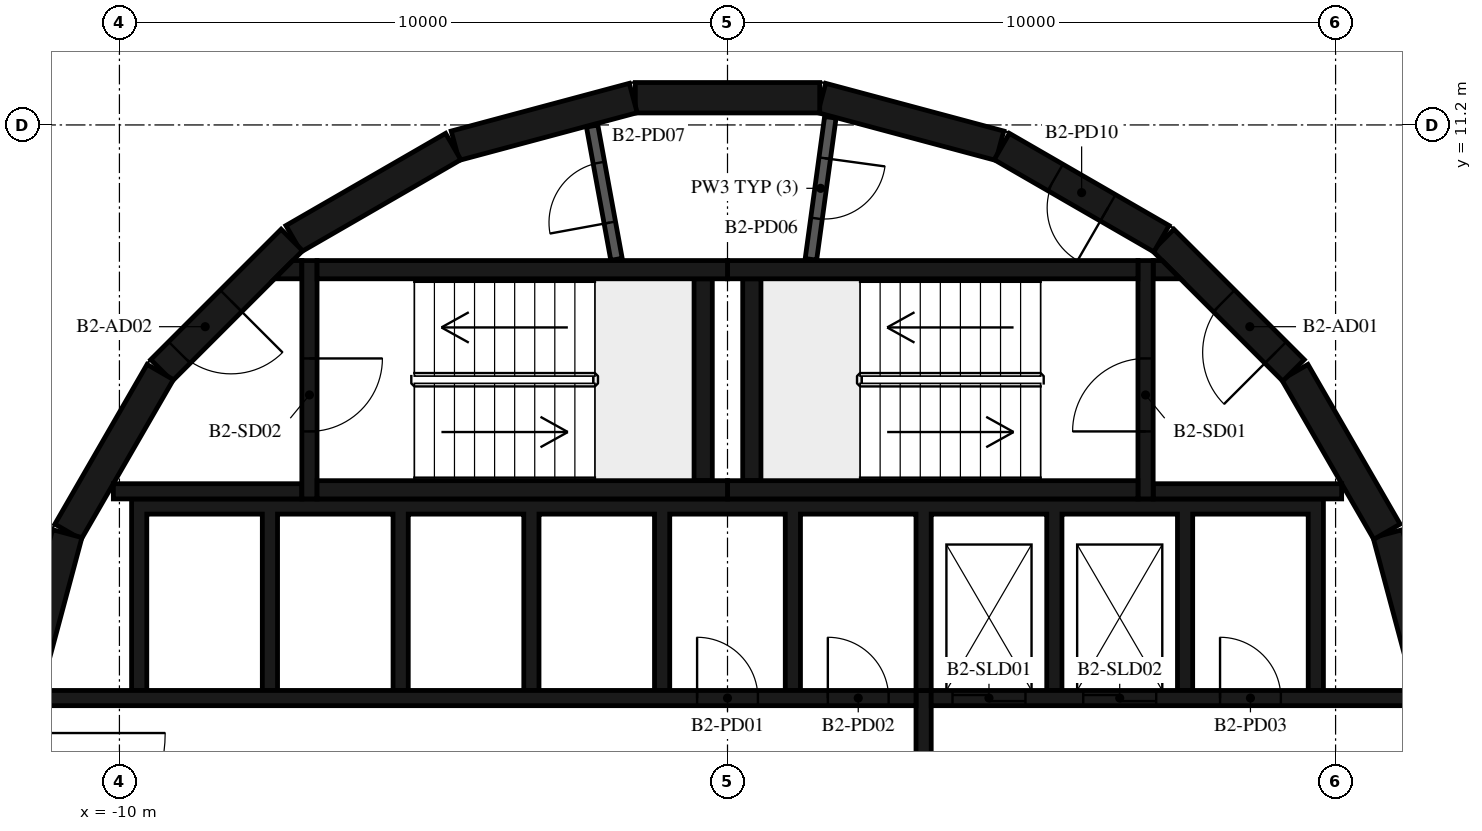
"""IFC4 building model, lengths in metres.
Left out: names, types, materials, properties, quantities, classifications, styles, units other than length and angle.
Written with IfcOpenShell. Run it as: python <this file> out.ifc"""

import sys

from ifc_helpers import new_model, si_unit, direction, frame, frame_2d, origin, place, context, subcontext, project, spatial, polyline, rectangle, outline, extrude, element, fill, save


model = new_model("IFC4")
c1 = context("Model", 3, precision=1e-05, world=origin(), true_north=direction((0.0, 1.0)))
c2 = subcontext(c1, "Body", "Model", "MODEL_VIEW")
j1 = project(units=[si_unit("LENGTHUNIT", "METRE"), si_unit("PLANEANGLEUNIT", "RADIAN")], contexts=[c1])
p1 = place(None, origin())
s1 = spatial("IfcSite", under=j1, at=p1, CompositionType="ELEMENT")
p2 = place(p1, origin())
s2 = spatial("IfcBuilding", under=s1, at=p2, CompositionType="ELEMENT")
p3 = place(p2, frame((0.0, 0.0, -8.4)))
s3 = spatial("IfcBuildingStorey", under=s2, at=p3, CompositionType="ELEMENT", Elevation=-8.4)
for number, where, z_axis, x_axis in (
    (1, (11.643, 1.55, 0.0), (0.0, 0.0, 1.0), (-0.259, 0.966, 0.0)),
    (2, (10.845, 4.51, 0.0), (0.0, 0.0, 1.0), (-0.5, 0.866, 0.0)),
):
    element("IfcWall", number, at=place(p3, frame(where, z_axis=z_axis, x_axis=x_axis)), inside=s3, PredefinedType="SHEAR", context=c2, shape_type="SweptSolid", body=[
        extrude(rectangle(XDim=3.033, YDim=0.5, at=frame_2d((1.516, 0.0))), origin(), (0.0, 0.0, 1.0), 3.82),
    ])
p4 = place(p3, frame((9.308, 7.164, 0.0), z_axis=(0.0, 0.0, 1.0), x_axis=(-0.707106781187, 0.707106781187, 0.0)))
e3 = element("IfcWall", 3, at=p4, inside=s3, PredefinedType="SHEAR", context=c2, shape_type="SweptSolid", body=[
    extrude(rectangle(XDim=3.032, YDim=0.5, at=frame_2d((1.516, 0.0))), origin(), (0.0, 0.0, 1.0), 3.82),
])
p5 = place(p4, frame((0.416, 0.0, 0.0)))
e4 = element("IfcOpeningElement", 4, at=p5, cuts=e3, PredefinedType="OPENING", context=c2, shape_type="SweptSolid", body=[
    extrude(rectangle(XDim=1.2, YDim=2.1, at=frame_2d((0.6, 1.05))), frame((0.0, 0.26, 0.0), z_axis=(0.0, -1.0, 0.0), x_axis=(1.0, 0.0, 0.0)), (0.0, 0.0, 1.0), 0.52),
])
p6 = place(p3, frame((7.137, 9.329, 0.0), z_axis=(0.0, 0.0, 1.0), x_axis=(-0.865975092491, 0.500087131594, 0.0)))
e5 = element("IfcWall", 5, at=p6, inside=s3, PredefinedType="SHEAR", context=c2, shape_type="SweptSolid", body=[
    extrude(rectangle(XDim=3.033, YDim=0.5, at=frame_2d((1.516, 0.0))), origin(), (0.0, 0.0, 1.0), 3.82),
])
p7 = place(p6, frame((1.016, 0.0, 0.0)))
e6 = element("IfcOpeningElement", 6, at=p7, cuts=e5, PredefinedType="OPENING", context=c2, shape_type="SweptSolid", body=[
    extrude(rectangle(XDim=1.0, YDim=2.4, at=frame_2d((0.5, 1.2))), frame((0.0, 0.26, 0.0), z_axis=(0.0, -1.0, 0.0), x_axis=(1.0, 0.0, 0.0)), (0.0, 0.0, 1.0), 0.52),
])
for number, where, z_axis, x_axis in (
    (7, (4.479, 10.858, 0.0), (0.0, 0.0, 1.0), (-0.966, 0.259, 0.0)),
    (8, (1.516, 11.647, 0.0), (0.0, 0.0, 1.0), (-1.0, 0.0, 0.0)),
    (9, (-1.55, 11.643, 0.0), (0.0, 0.0, 1.0), (-0.966, -0.259, 0.0)),
    (10, (-4.51, 10.845, 0.0), (0.0, 0.0, 1.0), (-0.866, -0.5, 0.0)),
):
    element("IfcWall", number, at=place(p3, frame(where, z_axis=z_axis, x_axis=x_axis)), inside=s3, PredefinedType="SHEAR", context=c2, shape_type="SweptSolid", body=[
        extrude(rectangle(XDim=3.033, YDim=0.5, at=frame_2d((1.516, 0.0))), origin(), (0.0, 0.0, 1.0), 3.82),
    ])
p8 = place(p3, frame((-7.164, 9.308, 0.0), z_axis=(0.0, 0.0, 1.0), x_axis=(-0.707106781187, -0.707106781187, 0.0)))
e11 = element("IfcWall", 11, at=p8, inside=s3, PredefinedType="SHEAR", context=c2, shape_type="SweptSolid", body=[
    extrude(rectangle(XDim=3.032, YDim=0.5, at=frame_2d((1.516, 0.0))), origin(), (0.0, 0.0, 1.0), 3.82),
])
p9 = place(p8, frame((1.416, 0.0, 0.0)))
e12 = element("IfcOpeningElement", 12, at=p9, cuts=e11, PredefinedType="OPENING", context=c2, shape_type="SweptSolid", body=[
    extrude(rectangle(XDim=1.2, YDim=2.1, at=frame_2d((0.6, 1.05))), frame((0.0, 0.26, 0.0), z_axis=(0.0, -1.0, 0.0), x_axis=(1.0, 0.0, 0.0)), (0.0, 0.0, 1.0), 0.52),
])
for number, where, z_axis, x_axis in (
    (13, (-9.329, 7.137, 0.0), (0.0, 0.0, 1.0), (-0.5, -0.866, 0.0)),
    (14, (-10.858, 4.479, 0.0), (0.0, 0.0, 1.0), (-0.259, -0.966, 0.0)),
):
    element("IfcWall", number, at=place(p3, frame(where, z_axis=z_axis, x_axis=x_axis)), inside=s3, PredefinedType="SHEAR", context=c2, shape_type="SweptSolid", body=[
        extrude(rectangle(XDim=3.033, YDim=0.5, at=frame_2d((1.516, 0.0))), origin(), (0.0, 0.0, 1.0), 3.82),
    ])
for number, where, z_axis, x_axis in (
    (15, (0.0, 5.2, 0.0), (0.0, 0.0, 1.0), (1.0, 0.0, 0.0)),
    (16, (0.0, 8.82, 0.0), (0.0, 0.0, 1.0), (1.0, 0.0, 0.0)),
):
    element("IfcWall", number, at=place(p3, frame(where, z_axis=z_axis, x_axis=x_axis)), inside=s3, PredefinedType="SHEAR", context=c2, shape_type="SweptSolid", body=[
        extrude(rectangle(XDim=6.75, YDim=0.3, at=frame_2d((3.375, 0.0))), origin(), (0.0, 0.0, 1.0), 3.82),
    ])
p10 = place(p3, frame((0.4, 5.35, 0.0), z_axis=(0.0, 0.0, 1.0), x_axis=(0.0, 1.0, 0.0)))
e17 = element("IfcWall", 17, at=p10, inside=s3, PredefinedType="SHEAR", context=c2, shape_type="SweptSolid", body=[
    extrude(rectangle(XDim=3.32, YDim=0.3, at=frame_2d((1.66, 0.0))), origin(), (0.0, 0.0, 1.0), 3.82),
])
p11 = place(p3, frame((6.875, 5.05, 0.0), z_axis=(0.0, 0.0, 1.0), x_axis=(0.0, 1.0, 0.0)))
e18 = element("IfcWall", 18, at=p11, inside=s3, PredefinedType="SHEAR", context=c2, shape_type="SweptSolid", body=[
    extrude(rectangle(XDim=3.92, YDim=0.25, at=frame_2d((1.96, 0.0))), origin(), (0.0, 0.0, 1.0), 3.82),
])
p12 = place(p11, frame((1.11, 0.0, 0.0)))
e19 = element("IfcOpeningElement", 19, at=p12, cuts=e18, PredefinedType="OPENING", context=c2, shape_type="SweptSolid", body=[
    extrude(rectangle(XDim=1.2, YDim=2.1, at=frame_2d((0.6, 1.05))), frame((0.0, 0.135, 0.0), z_axis=(0.0, -1.0, 0.0), x_axis=(1.0, 0.0, 0.0)), (0.0, 0.0, 1.0), 0.27),
])
p13 = place(p3, frame((7.0, 5.175, 0.0), z_axis=(0.0, 0.0, 1.0), x_axis=(1.0, 0.0, 0.0)))
e20 = element("IfcWall", 20, at=p13, inside=s3, PredefinedType="SHEAR", context=c2, shape_type="SweptSolid", body=[
    extrude(rectangle(XDim=3.1, YDim=0.25, at=frame_2d((1.55, 0.0))), origin(), (0.0, 0.0, 1.0), 3.82),
])
p14 = place(p3, origin())
e21 = element("IfcWall", 21, at=p14, inside=s3, PredefinedType="SHEAR", context=c2, shape_type="SweptSolid", body=[
    extrude(outline(polyline([(7.448, 8.67), (7.0, 8.67), (7.0, 8.97), (7.148, 8.97), (7.448, 8.67)])), origin(), (0.0, 0.0, 1.0), 3.82),
])
for number, where, z_axis, x_axis in (
    (22, (-6.75, 5.2, 0.0), (0.0, 0.0, 1.0), (1.0, 0.0, 0.0)),
    (23, (-6.75, 8.82, 0.0), (0.0, 0.0, 1.0), (1.0, 0.0, 0.0)),
):
    element("IfcWall", number, at=place(p3, frame(where, z_axis=z_axis, x_axis=x_axis)), inside=s3, PredefinedType="SHEAR", context=c2, shape_type="SweptSolid", body=[
        extrude(rectangle(XDim=6.75, YDim=0.3, at=frame_2d((3.375, 0.0))), origin(), (0.0, 0.0, 1.0), 3.82),
    ])
p15 = place(p3, frame((-0.4, 5.35, 0.0), z_axis=(0.0, 0.0, 1.0), x_axis=(0.0, 1.0, 0.0)))
e24 = element("IfcWall", 24, at=p15, inside=s3, PredefinedType="SHEAR", context=c2, shape_type="SweptSolid", body=[
    extrude(rectangle(XDim=3.32, YDim=0.3, at=frame_2d((1.66, 0.0))), origin(), (0.0, 0.0, 1.0), 3.82),
])
p16 = place(p3, frame((-6.875, 8.97, 0.0), z_axis=(0.0, 0.0, 1.0), x_axis=(0.0, -1.0, 0.0)))
e25 = element("IfcWall", 25, at=p16, inside=s3, PredefinedType="SHEAR", context=c2, shape_type="SweptSolid", body=[
    extrude(rectangle(XDim=3.92, YDim=0.25, at=frame_2d((1.96, 0.0))), origin(), (0.0, 0.0, 1.0), 3.82),
])
p17 = place(p16, frame((1.61, 0.0, 0.0)))
e26 = element("IfcOpeningElement", 26, at=p17, cuts=e25, PredefinedType="OPENING", context=c2, shape_type="SweptSolid", body=[
    extrude(rectangle(XDim=1.2, YDim=2.1, at=frame_2d((0.6, 1.05))), frame((0.0, 0.135, 0.0), z_axis=(0.0, -1.0, 0.0), x_axis=(1.0, 0.0, 0.0)), (0.0, 0.0, 1.0), 0.27),
])
p18 = place(p3, frame((-7.0, 5.175, 0.0), z_axis=(0.0, 0.0, 1.0), x_axis=(-1.0, 0.0, 0.0)))
e27 = element("IfcWall", 27, at=p18, inside=s3, PredefinedType="SHEAR", context=c2, shape_type="SweptSolid", body=[
    extrude(rectangle(XDim=3.1, YDim=0.25, at=frame_2d((1.55, 0.0))), origin(), (0.0, 0.0, 1.0), 3.82),
])
p19 = place(p3, origin())
e28 = element("IfcWall", 28, at=p19, inside=s3, PredefinedType="SHEAR", context=c2, shape_type="SweptSolid", body=[
    extrude(outline(polyline([(-7.148, 8.97), (-7.0, 8.97), (-7.0, 8.67), (-7.448, 8.67), (-7.148, 8.97)])), origin(), (0.0, 0.0, 1.0), 3.82),
])
p20 = place(p3, origin())
e29 = element("IfcWall", 29, at=p20, inside=s3, PredefinedType="SHEAR", context=c2, shape_type="SweptSolid", body=[
    extrude(outline(polyline([(-9.55, 4.8), (-7.65, 4.8), (-7.65, 1.9), (-7.4, 1.9), (-7.4, 4.8), (-5.5, 4.8), (-5.5, 1.9), (-5.25, 1.9), (-5.25, 4.8), (-3.35, 4.8), (-3.35, 1.9), (-3.1, 1.9), (-3.1, 4.8), (-1.2, 4.8), (-1.2, 1.9), (-0.95, 1.9), (-0.95, 4.8), (0.95, 4.8), (0.95, 1.9), (1.2, 1.9), (1.2, 4.8), (3.1, 4.8), (3.1, 1.9), (3.35, 1.9), (3.35, 4.8), (5.25, 4.8), (5.25, 1.9), (5.5, 1.9), (5.5, 4.8), (7.4, 4.8), (7.4, 1.9), (7.65, 1.9), (7.65, 4.8), (9.55, 4.8), (9.55, 1.9), (9.8, 1.9), (9.8, 4.8), (9.8, 5.05), (-9.8, 5.05), (-9.8, 4.8), (-9.8, 1.9), (-9.55, 1.9), (-9.55, 4.8)])), origin(), (0.0, 0.0, 1.0), 3.82),
])
p21 = place(p3, frame((-11.28, 1.775, 0.0), z_axis=(0.0, 0.0, 1.0), x_axis=(1.0, 0.0, 0.0)))
e30 = element("IfcWall", 30, at=p21, inside=s3, PredefinedType="SHEAR", context=c2, shape_type="SweptSolid", body=[
    extrude(rectangle(XDim=14.38, YDim=0.25, at=frame_2d((7.19, 0.0))), origin(), (0.0, 0.0, 1.0), 3.82),
])
p22 = place(p21, frame((10.78, 0.0, 0.0)))
e31 = element("IfcOpeningElement", 31, at=p22, cuts=e30, PredefinedType="OPENING", context=c2, shape_type="SweptSolid", body=[
    extrude(rectangle(XDim=1.0, YDim=2.4, at=frame_2d((0.5, 1.2))), frame((0.0, 0.135, 0.0), z_axis=(0.0, -1.0, 0.0), x_axis=(1.0, 0.0, 0.0)), (0.0, 0.0, 1.0), 0.27),
])
p23 = place(p21, frame((12.93, 0.0, 0.0)))
e32 = element("IfcOpeningElement", 32, at=p23, cuts=e30, PredefinedType="OPENING", context=c2, shape_type="SweptSolid", body=[
    extrude(rectangle(XDim=1.0, YDim=2.4, at=frame_2d((0.5, 1.2))), frame((0.0, 0.135, 0.0), z_axis=(0.0, -1.0, 0.0), x_axis=(1.0, 0.0, 0.0)), (0.0, 0.0, 1.0), 0.27),
])
p24 = place(p3, frame((3.35, 1.775, 0.0), z_axis=(0.0, 0.0, 1.0), x_axis=(1.0, 0.0, 0.0)))
e33 = element("IfcWall", 33, at=p24, inside=s3, PredefinedType="SHEAR", context=c2, shape_type="SweptSolid", body=[
    extrude(rectangle(XDim=7.93, YDim=0.25, at=frame_2d((3.965, 0.0))), origin(), (0.0, 0.0, 1.0), 3.82),
])
p25 = place(p24, frame((0.35, 0.0, 0.0)))
e34 = element("IfcOpeningElement", 34, at=p25, cuts=e33, PredefinedType="OPENING", context=c2, shape_type="SweptSolid", body=[
    extrude(rectangle(XDim=1.2, YDim=2.4, at=frame_2d((0.6, 1.2))), frame((0.0, 0.135, 0.0), z_axis=(0.0, -1.0, 0.0), x_axis=(1.0, 0.0, 0.0)), (0.0, 0.0, 1.0), 0.27),
])
p26 = place(p24, frame((2.5, 0.0, 0.0)))
e35 = element("IfcOpeningElement", 35, at=p26, cuts=e33, PredefinedType="OPENING", context=c2, shape_type="SweptSolid", body=[
    extrude(rectangle(XDim=1.2, YDim=2.4, at=frame_2d((0.6, 1.2))), frame((0.0, 0.135, 0.0), z_axis=(0.0, -1.0, 0.0), x_axis=(1.0, 0.0, 0.0)), (0.0, 0.0, 1.0), 0.27),
])
p27 = place(p24, frame((4.75, 0.0, 0.0)))
e36 = element("IfcOpeningElement", 36, at=p27, cuts=e33, PredefinedType="OPENING", context=c2, shape_type="SweptSolid", body=[
    extrude(rectangle(XDim=1.0, YDim=2.4, at=frame_2d((0.5, 1.2))), frame((0.0, 0.135, 0.0), z_axis=(0.0, -1.0, 0.0), x_axis=(1.0, 0.0, 0.0)), (0.0, 0.0, 1.0), 0.27),
])
p28 = place(p3, frame((3.225, -1.9, 0.0), z_axis=(0.0, 0.0, 1.0), x_axis=(0.0, 1.0, 0.0)))
e37 = element("IfcWall", 37, at=p28, inside=s3, PredefinedType="SHEAR", context=c2, shape_type="SweptSolid", body=[
    extrude(rectangle(XDim=3.8, YDim=0.25, at=frame_2d((1.9, 0.0))), origin(), (0.0, 0.0, 1.0), 3.82),
])
p29 = place(p3, frame((1.691, 11.326, 0.0), z_axis=(0.0, 0.0, 1.0), x_axis=(-0.135344253201, -0.990798633994, 0.0)))
e38 = element("IfcWall", 38, at=p29, inside=s3, PredefinedType="PARTITIONING", context=c2, shape_type="SweptSolid", body=[
    extrude(rectangle(XDim=2.358, YDim=0.19, at=frame_2d((1.179, 0.0))), origin(), (0.0, 0.0, 1.0), 3.82),
])
p30 = place(p29, frame((0.679, 0.0, 0.0)))
e39 = element("IfcOpeningElement", 39, at=p30, cuts=e38, PredefinedType="OPENING", context=c2, shape_type="SweptSolid", body=[
    extrude(rectangle(XDim=1.0, YDim=2.4, at=frame_2d((0.5, 1.2))), frame((0.0, 0.105, 0.0), z_axis=(0.0, -1.0, 0.0), x_axis=(1.0, 0.0, 0.0)), (0.0, 0.0, 1.0), 0.21),
])
p31 = place(p3, frame((-1.825, 8.99, 0.0), z_axis=(0.0, 0.0, 1.0), x_axis=(-0.179955206115, 0.983674805915, 0.0)))
e40 = element("IfcWall", 40, at=p31, inside=s3, PredefinedType="PARTITIONING", context=c2, shape_type="SweptSolid", body=[
    extrude(rectangle(XDim=2.229, YDim=0.19, at=frame_2d((1.115, 0.0))), origin(), (0.0, 0.0, 1.0), 3.82),
])
p32 = place(p31, frame((0.615, 0.0, 0.0)))
e41 = element("IfcOpeningElement", 41, at=p32, cuts=e40, PredefinedType="OPENING", context=c2, shape_type="SweptSolid", body=[
    extrude(rectangle(XDim=1.0, YDim=2.4, at=frame_2d((0.5, 1.2))), frame((0.0, 0.105, 0.0), z_axis=(0.0, -1.0, 0.0), x_axis=(1.0, 0.0, 0.0)), (0.0, 0.0, 1.0), 0.21),
])
p33 = place(p12, origin())
e42 = element("IfcDoor", 42, at=p33, inside=s3, OperationType="SINGLE_SWING_LEFT", PredefinedType="DOOR", context=c2, shape_type="SweptSolid", body=[
    extrude(rectangle(XDim=1.2, YDim=2.1, at=frame_2d((0.6, 1.05))), frame((0.0, 0.025, 0.0), z_axis=(0.0, -1.0, 0.0), x_axis=(1.0, 0.0, 0.0)), (0.0, 0.0, 1.0), 0.05),
])
fill(e19, e42)
p34 = place(p5, origin())
e43 = element("IfcDoor", 43, at=p34, inside=s3, OperationType="SINGLE_SWING_RIGHT", PredefinedType="DOOR", context=c2, shape_type="SweptSolid", body=[
    extrude(rectangle(XDim=1.2, YDim=2.1, at=frame_2d((0.6, 1.05))), frame((0.0, 0.025, 0.0), z_axis=(0.0, -1.0, 0.0), x_axis=(1.0, 0.0, 0.0)), (0.0, 0.0, 1.0), 0.05),
])
fill(e4, e43)
p35 = place(p17, origin())
e44 = element("IfcDoor", 44, at=p35, inside=s3, OperationType="SINGLE_SWING_LEFT", PredefinedType="DOOR", context=c2, shape_type="SweptSolid", body=[
    extrude(rectangle(XDim=1.2, YDim=2.1, at=frame_2d((0.6, 1.05))), frame((0.0, 0.025, 0.0), z_axis=(0.0, -1.0, 0.0), x_axis=(1.0, 0.0, 0.0)), (0.0, 0.0, 1.0), 0.05),
])
fill(e26, e44)
p36 = place(p9, origin())
e45 = element("IfcDoor", 45, at=p36, inside=s3, OperationType="SINGLE_SWING_RIGHT", PredefinedType="DOOR", context=c2, shape_type="SweptSolid", body=[
    extrude(rectangle(XDim=1.2, YDim=2.1, at=frame_2d((0.6, 1.05))), frame((0.0, 0.025, 0.0), z_axis=(0.0, -1.0, 0.0), x_axis=(1.0, 0.0, 0.0)), (0.0, 0.0, 1.0), 0.05),
])
fill(e12, e45)
p37 = place(p25, origin())
e46 = element("IfcDoor", 46, at=p37, inside=s3, OperationType="DOUBLE_DOOR_SLIDING", PredefinedType="DOOR", context=c2, shape_type="SweptSolid", body=[
    extrude(rectangle(XDim=1.2, YDim=2.4, at=frame_2d((0.6, 1.2))), frame((0.0, 0.025, 0.0), z_axis=(0.0, -1.0, 0.0), x_axis=(1.0, 0.0, 0.0)), (0.0, 0.0, 1.0), 0.05),
])
fill(e34, e46)
p38 = place(p26, origin())
e47 = element("IfcDoor", 47, at=p38, inside=s3, OperationType="DOUBLE_DOOR_SLIDING", PredefinedType="DOOR", context=c2, shape_type="SweptSolid", body=[
    extrude(rectangle(XDim=1.2, YDim=2.4, at=frame_2d((0.6, 1.2))), frame((0.0, 0.025, 0.0), z_axis=(0.0, -1.0, 0.0), x_axis=(1.0, 0.0, 0.0)), (0.0, 0.0, 1.0), 0.05),
])
fill(e35, e47)
p39 = place(p22, origin())
e48 = element("IfcDoor", 48, at=p39, inside=s3, OperationType="SINGLE_SWING_RIGHT", PredefinedType="DOOR", context=c2, shape_type="SweptSolid", body=[
    extrude(rectangle(XDim=1.0, YDim=2.4, at=frame_2d((0.5, 1.2))), frame((0.0, 0.025, 0.0), z_axis=(0.0, -1.0, 0.0), x_axis=(1.0, 0.0, 0.0)), (0.0, 0.0, 1.0), 0.05),
])
fill(e31, e48)
p40 = place(p23, origin())
e49 = element("IfcDoor", 49, at=p40, inside=s3, OperationType="SINGLE_SWING_LEFT", PredefinedType="DOOR", context=c2, shape_type="SweptSolid", body=[
    extrude(rectangle(XDim=1.0, YDim=2.4, at=frame_2d((0.5, 1.2))), frame((0.0, 0.025, 0.0), z_axis=(0.0, -1.0, 0.0), x_axis=(1.0, 0.0, 0.0)), (0.0, 0.0, 1.0), 0.05),
])
fill(e32, e49)
p41 = place(p27, origin())
e50 = element("IfcDoor", 50, at=p41, inside=s3, OperationType="SINGLE_SWING_RIGHT", PredefinedType="DOOR", context=c2, shape_type="SweptSolid", body=[
    extrude(rectangle(XDim=1.0, YDim=2.4, at=frame_2d((0.5, 1.2))), frame((0.0, 0.025, 0.0), z_axis=(0.0, -1.0, 0.0), x_axis=(1.0, 0.0, 0.0)), (0.0, 0.0, 1.0), 0.05),
])
fill(e36, e50)
p42 = place(p30, origin())
e51 = element("IfcDoor", 51, at=p42, inside=s3, OperationType="SINGLE_SWING_LEFT", PredefinedType="DOOR", context=c2, shape_type="SweptSolid", body=[
    extrude(rectangle(XDim=1.0, YDim=2.4, at=frame_2d((0.5, 1.2))), frame((0.0, 0.025, 0.0), z_axis=(0.0, -1.0, 0.0), x_axis=(1.0, 0.0, 0.0)), (0.0, 0.0, 1.0), 0.05),
])
fill(e39, e51)
p43 = place(p32, origin())
e52 = element("IfcDoor", 52, at=p43, inside=s3, OperationType="SINGLE_SWING_RIGHT", PredefinedType="DOOR", context=c2, shape_type="SweptSolid", body=[
    extrude(rectangle(XDim=1.0, YDim=2.4, at=frame_2d((0.5, 1.2))), frame((0.0, 0.025, 0.0), z_axis=(0.0, -1.0, 0.0), x_axis=(1.0, 0.0, 0.0)), (0.0, 0.0, 1.0), 0.05),
])
fill(e41, e52)
p44 = place(p7, origin())
e53 = element("IfcDoor", 53, at=p44, inside=s3, OperationType="SINGLE_SWING_LEFT", PredefinedType="DOOR", context=c2, shape_type="SweptSolid", body=[
    extrude(rectangle(XDim=1.0, YDim=2.4, at=frame_2d((0.5, 1.2))), frame((0.0, 0.025, 0.0), z_axis=(0.0, -1.0, 0.0), x_axis=(1.0, 0.0, 0.0)), (0.0, 0.0, 1.0), 0.05),
])
fill(e6, e53)
save(model, sys.argv[1])
